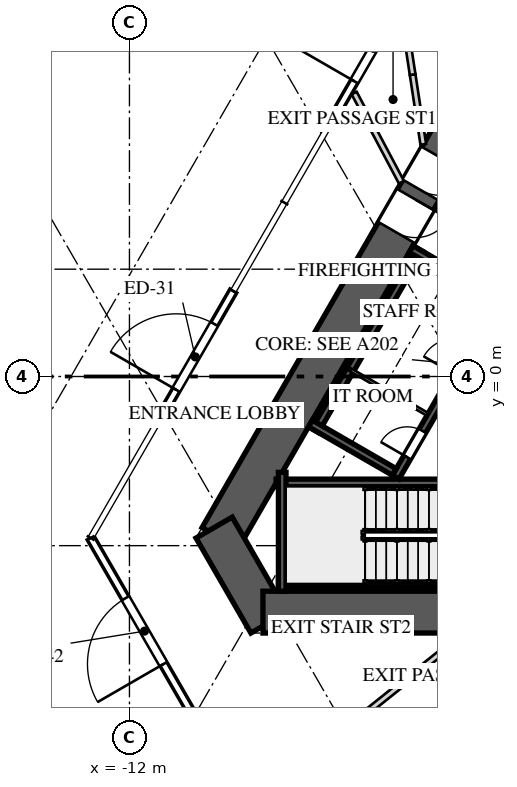
"""IFC4 building model, lengths in metres.
Left out: names, types, materials, properties, quantities, classifications, styles, units other than length and angle.
Written with IfcOpenShell. Run it as: python <this file> out.ifc"""

import sys

from ifc_helpers import new_model, si_unit, direction, frame, frame_2d, origin, place, context, subcontext, project, spatial, rectangle, extrude, element, fill, save


model = new_model("IFC4")
c1 = context("Model", 3, precision=1e-05, world=origin(), true_north=direction((0.0, 1.0)))
c2 = subcontext(c1, "Body", "Model", "MODEL_VIEW")
j1 = project(units=[si_unit("LENGTHUNIT", "METRE"), si_unit("PLANEANGLEUNIT", "RADIAN")], contexts=[c1])
p1 = place(None, origin())
s1 = spatial("IfcSite", under=j1, at=p1, CompositionType="ELEMENT")
p2 = place(p1, origin())
s2 = spatial("IfcBuilding", under=s1, at=p2, CompositionType="ELEMENT")
p3 = place(p2, origin())
s3 = spatial("IfcBuildingStorey", under=s2, at=p3, CompositionType="ELEMENT", Elevation=0.0)
p4 = place(p3, frame((-1.126, 10.45, 0.0), z_axis=(0.0, 0.0, 1.0), x_axis=(-0.500001757713, -0.866024388966, 0.0)))
e1 = element("IfcWall", 1, at=p4, inside=s3, PredefinedType="SHEAR", context=c2, shape_type="SweptSolid", body=[
    extrude(rectangle(XDim=16.974, YDim=1.1, at=frame_2d((8.487, 0.0))), origin(), (0.0, 0.0, 1.0), 10.0),
])
p5 = place(p4, frame((5.407, 0.0, 0.0)))
e2 = element("IfcOpeningElement", 2, at=p5, cuts=e1, PredefinedType="OPENING", context=c2, shape_type="SweptSolid", body=[
    extrude(rectangle(XDim=1.0, YDim=2.4, at=frame_2d((0.5, 1.2))), frame((0.0, 0.56, 0.0), z_axis=(0.0, -1.0, 0.0), x_axis=(1.0, 0.0, 0.0)), (0.0, 0.0, 1.0), 1.12),
])
p6 = place(p4, frame((6.692, 0.0, 0.0)))
e3 = element("IfcOpeningElement", 3, at=p6, cuts=e1, PredefinedType="OPENING", context=c2, shape_type="SweptSolid", body=[
    extrude(rectangle(XDim=1.0, YDim=2.4, at=frame_2d((0.5, 1.2))), frame((0.0, 0.56, 0.0), z_axis=(0.0, -1.0, 0.0), x_axis=(1.0, 0.0, 0.0)), (0.0, 0.0, 1.0), 1.12),
])
p7 = place(p3, frame((-9.772, -3.975, 0.0), z_axis=(0.0, 0.0, 1.0), x_axis=(0.499995765644, -0.866027848477, 0.0)))
e4 = element("IfcWall", 4, at=p7, inside=s3, PredefinedType="SHEAR", context=c2, shape_type="SweptSolid", body=[
    extrude(rectangle(XDim=2.887, YDim=1.1, at=frame_2d((1.443, 0.0))), origin(), (0.0, 0.0, 1.0), 10.0),
])
p8 = place(p3, frame((-8.487, -6.2, 0.0), z_axis=(0.0, 0.0, 1.0), x_axis=(1.0, 0.0, 0.0)))
e5 = element("IfcWall", 5, at=p8, inside=s3, PredefinedType="SHEAR", context=c2, shape_type="SweptSolid", body=[
    extrude(rectangle(XDim=16.974, YDim=1.1, at=frame_2d((8.487, 0.0))), origin(), (0.0, 0.0, 1.0), 10.0),
])
p9 = place(p8, frame((5.407, 0.0, 0.0)))
e6 = element("IfcOpeningElement", 6, at=p9, cuts=e5, PredefinedType="OPENING", context=c2, shape_type="SweptSolid", body=[
    extrude(rectangle(XDim=1.0, YDim=2.4, at=frame_2d((0.5, 1.2))), frame((0.0, 0.56, 0.0), z_axis=(0.0, -1.0, 0.0), x_axis=(1.0, 0.0, 0.0)), (0.0, 0.0, 1.0), 1.12),
])
p10 = place(p8, frame((6.692, 0.0, 0.0)))
e7 = element("IfcOpeningElement", 7, at=p10, cuts=e5, PredefinedType="OPENING", context=c2, shape_type="SweptSolid", body=[
    extrude(rectangle(XDim=1.0, YDim=2.4, at=frame_2d((0.5, 1.2))), frame((0.0, 0.56, 0.0), z_axis=(0.0, -1.0, 0.0), x_axis=(1.0, 0.0, 0.0)), (0.0, 0.0, 1.0), 1.12),
])
p11 = place(p8, frame((14.397, 0.0, 0.0)))
e8 = element("IfcOpeningElement", 8, at=p11, cuts=e5, PredefinedType="OPENING", context=c2, shape_type="SweptSolid", body=[
    extrude(rectangle(XDim=0.8, YDim=2.1, at=frame_2d((0.4, 1.05))), frame((0.0, 0.56, 0.0), z_axis=(0.0, -1.0, 0.0), x_axis=(1.0, 0.0, 0.0)), (0.0, 0.0, 1.0), 1.12),
])
p12 = place(p3, frame((-10.19, -9.15, 0.0), z_axis=(0.0, 0.0, 1.0), x_axis=(-0.500018773155, 0.866014564827, 0.0)))
e9 = element("IfcWall", 9, at=p12, inside=s3, PredefinedType="STANDARD", context=c2, shape_type="SweptSolid", body=[
    extrude(rectangle(XDim=5.658, YDim=0.2, at=frame_2d((2.829, 0.0))), origin(), (0.0, 0.0, 1.0), 4.0),
])
p13 = place(p12, frame((1.829, 0.0, 0.0)))
e10 = element("IfcOpeningElement", 10, at=p13, cuts=e9, PredefinedType="OPENING", context=c2, shape_type="SweptSolid", body=[
    extrude(rectangle(XDim=2.0, YDim=2.6, at=frame_2d((1.0, 1.3))), frame((0.0, 0.11, 0.0), z_axis=(0.0, -1.0, 0.0), x_axis=(1.0, 0.0, 0.0)), (0.0, 0.0, 1.0), 0.22),
])
p14 = place(p3, frame((-11.268, -1.217, 0.0), z_axis=(0.0, 0.0, 1.0), x_axis=(0.49999894854, 0.866026010844, 0.0)))
e11 = element("IfcWall", 11, at=p14, inside=s3, PredefinedType="STANDARD", context=c2, shape_type="SweptSolid", body=[
    extrude(rectangle(XDim=4.0, YDim=0.2, at=frame_2d((2.0, 0.0))), origin(), (0.0, 0.0, 1.0), 4.0),
])
p15 = place(p14, frame((1.0, 0.0, 0.0)))
e12 = element("IfcOpeningElement", 12, at=p15, cuts=e11, PredefinedType="OPENING", context=c2, shape_type="SweptSolid", body=[
    extrude(rectangle(XDim=2.0, YDim=2.6, at=frame_2d((1.0, 1.3))), frame((0.0, 0.11, 0.0), z_axis=(0.0, -1.0, 0.0), x_axis=(1.0, 0.0, 0.0)), (0.0, 0.0, 1.0), 0.22),
])
p16 = place(p3, frame((-6.58, 6.902, 0.0), z_axis=(0.0, 0.0, 1.0), x_axis=(0.49999894854, 0.866026010844, 0.0)))
e13 = element("IfcWall", 13, at=p16, inside=s3, PredefinedType="STANDARD", context=c2, shape_type="SweptSolid", body=[
    extrude(rectangle(XDim=4.0, YDim=0.2, at=frame_2d((2.0, 0.0))), origin(), (0.0, 0.0, 1.0), 4.0),
])
p17 = place(p16, frame((1.0, 0.0, 0.0)))
e14 = element("IfcOpeningElement", 14, at=p17, cuts=e13, PredefinedType="OPENING", context=c2, shape_type="SweptSolid", body=[
    extrude(rectangle(XDim=2.0, YDim=2.6, at=frame_2d((1.0, 1.3))), frame((0.0, 0.11, 0.0), z_axis=(0.0, -1.0, 0.0), x_axis=(1.0, 0.0, 0.0)), (0.0, 0.0, 1.0), 0.22),
])
p18 = place(p3, frame((-1.521, 3.165, 0.0), z_axis=(0.0, 0.0, 1.0), x_axis=(-0.866027397988, 0.499996545922, 0.0)))
e15 = element("IfcWall", 15, at=p18, inside=s3, PredefinedType="SOLIDWALL", context=c2, shape_type="SweptSolid", body=[
    extrude(rectangle(XDim=2.75, YDim=0.2, at=frame_2d((1.375, 0.0))), origin(), (0.0, 0.0, 1.0), 9.65),
])
p19 = place(p18, frame((0.725, 0.0, 0.0)))
e16 = element("IfcOpeningElement", 16, at=p19, cuts=e15, PredefinedType="OPENING", context=c2, shape_type="SweptSolid", body=[
    extrude(rectangle(XDim=1.1, YDim=2.4, at=frame_2d((0.55, 1.2))), frame((0.0, 0.11, 0.0), z_axis=(0.0, -1.0, 0.0), x_axis=(1.0, 0.0, 0.0)), (0.0, 0.0, 1.0), 0.22),
])
p20 = place(p3, frame((-8.08, -5.45, 0.0), z_axis=(0.0, 0.0, 1.0), x_axis=(1.0, 0.0, 0.0)))
e17 = element("IfcWall", 17, at=p20, inside=s3, PredefinedType="SOLIDWALL", context=c2, shape_type="SweptSolid", body=[
    extrude(rectangle(XDim=4.95, YDim=0.2, at=frame_2d((2.475, 0.0))), origin(), (0.0, 0.0, 1.0), 9.65),
])
p21 = place(p3, frame((-8.141, -2.8, 0.0), z_axis=(0.0, 0.0, 1.0), x_axis=(1.0, 0.0, 0.0)))
e18 = element("IfcWall", 18, at=p21, inside=s3, PredefinedType="SOLIDWALL", context=c2, shape_type="SweptSolid", body=[
    extrude(rectangle(XDim=6.261, YDim=0.2, at=frame_2d((3.13, 0.0))), origin(), (0.0, 0.0, 1.0), 9.65),
])
p22 = place(p3, frame((-7.98, -2.522, 0.0), z_axis=(0.0, 0.0, 1.0), x_axis=(0.0, -1.0, 0.0)))
e19 = element("IfcWall", 19, at=p22, inside=s3, PredefinedType="SOLIDWALL", context=c2, shape_type="SweptSolid", body=[
    extrude(rectangle(XDim=3.128, YDim=0.2, at=frame_2d((1.564, 0.0))), origin(), (0.0, 0.0, 1.0), 9.65),
])
p23 = place(p3, frame((-4.993, -2.648, 0.0), z_axis=(0.0, 0.0, 1.0), x_axis=(0.499996545922, 0.866027397988, 0.0)))
e20 = element("IfcWall", 20, at=p23, inside=s3, PredefinedType="SOLIDWALL", context=c2, shape_type="SweptSolid", body=[
    extrude(rectangle(XDim=5.5, YDim=0.2, at=frame_2d((2.75, 0.0))), origin(), (0.0, 0.0, 1.0), 9.65),
])
p24 = place(p23, frame((3.12, 0.0, 0.0)))
e21 = element("IfcOpeningElement", 21, at=p24, cuts=e20, PredefinedType="OPENING", context=c2, shape_type="SweptSolid", body=[
    extrude(rectangle(XDim=0.95, YDim=2.4, at=frame_2d((0.475, 1.2))), frame((0.0, 0.11, 0.0), z_axis=(0.0, -1.0, 0.0), x_axis=(1.0, 0.0, 0.0)), (0.0, 0.0, 1.0), 0.22),
])
p25 = place(p23, frame((0.605, 0.0, 0.0)))
e22 = element("IfcOpeningElement", 22, at=p25, cuts=e20, PredefinedType="OPENING", context=c2, shape_type="SweptSolid", body=[
    extrude(rectangle(XDim=0.8, YDim=2.1, at=frame_2d((0.4, 1.05))), frame((0.0, 0.11, 0.0), z_axis=(0.0, -1.0, 0.0), x_axis=(1.0, 0.0, 0.0)), (0.0, 0.0, 1.0), 0.22),
])
p26 = place(p3, frame((-4.365, 3.34, 0.0), z_axis=(0.0, 0.0, 1.0), x_axis=(-0.499996545922, -0.866027397988, 0.0)))
e23 = element("IfcWall", 23, at=p26, inside=s3, PredefinedType="SOLIDWALL", context=c2, shape_type="SweptSolid", body=[
    extrude(rectangle(XDim=5.5, YDim=0.2, at=frame_2d((2.75, 0.0))), origin(), (0.0, 0.0, 1.0), 9.65),
])
for number, where, z_axis, x_axis in (
    (24, (-2.38, 2.078, 0.0), (0.0, 0.0, 1.0), (-0.866, 0.5, 0.0)),
    (25, (-5.03, -2.512, 0.0), (0.0, 0.0, 1.0), (-0.866, 0.5, 0.0)),
):
    element("IfcWall", number, at=place(p3, frame(where, z_axis=z_axis, x_axis=x_axis)), inside=s3, PredefinedType="SOLIDWALL", context=c2, shape_type="SweptSolid", body=[
        extrude(rectangle(XDim=2.55, YDim=0.2, at=frame_2d((1.275, 0.0))), origin(), (0.0, 0.0, 1.0), 9.65),
    ])
p27 = place(p3, frame((-4.155, -0.996, 0.0), z_axis=(0.0, 0.0, 1.0), x_axis=(-0.866016039709, 0.500016218704, 0.0)))
e26 = element("IfcWall", 26, at=p27, inside=s3, PredefinedType="PARTITIONING", context=c2, shape_type="SweptSolid", body=[
    extrude(rectangle(XDim=2.35, YDim=0.08, at=frame_2d((1.175, 0.0))), origin(), (0.0, 0.0, 1.0), 9.65),
])
p28 = place(p3, frame((-4.268, 6.107, 0.0), z_axis=(0.0, 0.0, 1.0), x_axis=(-0.151020047148, 0.988530700261, 0.0)))
e27 = element("IfcWall", 27, at=p28, inside=s3, PredefinedType="PARTITIONING", context=c2, shape_type="SweptSolid", body=[
    extrude(rectangle(XDim=1.857, YDim=0.15, at=frame_2d((0.929, 0.0))), origin(), (0.0, 0.0, 1.0), 9.65),
])
p29 = place(p3, frame((-4.549, 7.944, 0.0), z_axis=(0.0, 0.0, 1.0), x_axis=(-0.151067241463, 0.988523489127, 0.0)))
e28 = element("IfcWall", 28, at=p29, inside=s3, PredefinedType="PARTITIONING", context=c2, shape_type="SweptSolid", body=[
    extrude(rectangle(XDim=1.742, YDim=0.15, at=frame_2d((0.871, 0.0))), origin(), (0.0, 0.0, 1.0), 8.75),
])
p30 = place(p3, frame((-4.843, 5.111, 0.0), z_axis=(0.0, 0.0, 1.0), x_axis=(-0.468272102551, 0.883584312883, 0.0)))
e29 = element("IfcWall", 29, at=p30, inside=s3, PredefinedType="PARTITIONING", context=c2, shape_type="SweptSolid", body=[
    extrude(rectangle(XDim=2.655, YDim=0.15, at=frame_2d((1.328, 0.0))), origin(), (0.0, 0.0, 1.0), 9.65),
])
p31 = place(p3, frame((-3.155, -6.75, 0.0), z_axis=(0.0, 0.0, 1.0), x_axis=(-0.780560976865, -0.625079644042, 0.0)))
e30 = element("IfcWall", 30, at=p31, inside=s3, PredefinedType="PARTITIONING", context=c2, shape_type="SweptSolid", body=[
    extrude(rectangle(XDim=1.858, YDim=0.15, at=frame_2d((0.929, 0.0))), origin(), (0.0, 0.0, 1.0), 9.65),
])
p32 = place(p3, frame((-4.605, -7.911, 0.0), z_axis=(0.0, 0.0, 1.0), x_axis=(-0.780650026042, -0.624968428675, 0.0)))
e31 = element("IfcWall", 31, at=p32, inside=s3, PredefinedType="PARTITIONING", context=c2, shape_type="SweptSolid", body=[
    extrude(rectangle(XDim=1.742, YDim=0.15, at=frame_2d((0.871, 0.0))), origin(), (0.0, 0.0, 1.0), 8.75),
])
p33 = place(p13, origin())
e32 = element("IfcDoor", 32, at=p33, inside=s3, OperationType="DOUBLE_DOOR_SINGLE_SWING", PredefinedType="DOOR", context=c2, shape_type="SweptSolid", body=[
    extrude(rectangle(XDim=2.0, YDim=2.6, at=frame_2d((1.0, 1.3))), frame((0.0, 0.025, 0.0), z_axis=(0.0, -1.0, 0.0), x_axis=(1.0, 0.0, 0.0)), (0.0, 0.0, 1.0), 0.05),
])
fill(e10, e32)
p34 = place(p15, origin())
e33 = element("IfcDoor", 33, at=p34, inside=s3, OperationType="DOUBLE_DOOR_SINGLE_SWING", PredefinedType="DOOR", context=c2, shape_type="SweptSolid", body=[
    extrude(rectangle(XDim=2.0, YDim=2.6, at=frame_2d((1.0, 1.3))), frame((0.0, 0.025, 0.0), z_axis=(0.0, -1.0, 0.0), x_axis=(1.0, 0.0, 0.0)), (0.0, 0.0, 1.0), 0.05),
])
fill(e12, e33)
p35 = place(p17, origin())
e34 = element("IfcDoor", 34, at=p35, inside=s3, OperationType="DOUBLE_DOOR_SINGLE_SWING", PredefinedType="DOOR", context=c2, shape_type="SweptSolid", body=[
    extrude(rectangle(XDim=2.0, YDim=2.6, at=frame_2d((1.0, 1.3))), frame((0.0, 0.025, 0.0), z_axis=(0.0, -1.0, 0.0), x_axis=(1.0, 0.0, 0.0)), (0.0, 0.0, 1.0), 0.05),
])
fill(e14, e34)
p36 = place(p25, origin())
e35 = element("IfcDoor", 35, at=p36, inside=s3, OperationType="SINGLE_SWING_RIGHT", PredefinedType="DOOR", context=c2, shape_type="SweptSolid", body=[
    extrude(rectangle(XDim=0.8, YDim=2.1, at=frame_2d((0.4, 1.05))), frame((0.0, 0.025, 0.0), z_axis=(0.0, -1.0, 0.0), x_axis=(1.0, 0.0, 0.0)), (0.0, 0.0, 1.0), 0.05),
])
fill(e22, e35)
p37 = place(p5, origin())
e36 = element("IfcDoor", 36, at=p37, inside=s3, OperationType="SINGLE_SWING_LEFT", PredefinedType="DOOR", context=c2, shape_type="SweptSolid", body=[
    extrude(rectangle(XDim=1.0, YDim=2.4, at=frame_2d((0.5, 1.2))), frame((0.0, 0.025, 0.0), z_axis=(0.0, -1.0, 0.0), x_axis=(1.0, 0.0, 0.0)), (0.0, 0.0, 1.0), 0.05),
])
fill(e2, e36)
p38 = place(p6, origin())
e37 = element("IfcDoor", 37, at=p38, inside=s3, OperationType="SINGLE_SWING_LEFT", PredefinedType="DOOR", context=c2, shape_type="SweptSolid", body=[
    extrude(rectangle(XDim=1.0, YDim=2.4, at=frame_2d((0.5, 1.2))), frame((0.0, 0.025, 0.0), z_axis=(0.0, -1.0, 0.0), x_axis=(1.0, 0.0, 0.0)), (0.0, 0.0, 1.0), 0.05),
])
fill(e3, e37)
save(model, sys.argv[1])
